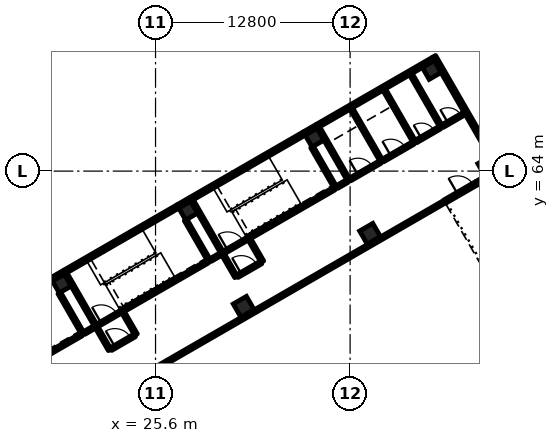
"""IFC4 building model, lengths in metres.
Left out: names, types, materials, properties, quantities, classifications, styles, units other than length and angle.
Written with IfcOpenShell. Run it as: python <this file> out.ifc"""

import sys

from ifc_helpers import new_model, si_unit, direction, frame, frame_2d, origin, origin_2d, place, context, subcontext, project, spatial, rectangle, extrude, element, fill, save


model = new_model("IFC4")
c1 = context("Model", 3, precision=1e-05, world=origin(), true_north=direction((0.0, 1.0)))
c2 = subcontext(c1, "Body", "Model", "MODEL_VIEW")
j1 = project(units=[si_unit("LENGTHUNIT", "METRE"), si_unit("PLANEANGLEUNIT", "RADIAN")], contexts=[c1])
p1 = place(None, origin())
s1 = spatial("IfcSite", under=j1, at=p1, CompositionType="ELEMENT")
p2 = place(p1, origin())
s2 = spatial("IfcBuilding", under=s1, at=p2, CompositionType="ELEMENT")
p3 = place(p2, frame((0.0, 0.0, 11.4)))
s3 = spatial("IfcBuildingStorey", under=s2, at=p3, CompositionType="ELEMENT", Elevation=11.4)
for number, where, z_axis, x_axis in (
    (1, (31.396, 55.077, 0.0), (0.0, 0.0, 1.0), (-0.5, 0.866, 0.0)),
    (2, (39.71, 59.877, 0.0), (0.0, 0.0, 1.0), (-0.5, 0.866, 0.0)),
):
    element("IfcColumn", number, at=place(p3, frame(where, z_axis=z_axis, x_axis=x_axis)), inside=s3, PredefinedType="COLUMN", context=c2, shape_type="SweptSolid", body=[
        extrude(rectangle(XDim=1.0, YDim=1.0, at=origin_2d()), origin(), (0.0, 0.0, 1.0), 4.8),
    ])
for number, where, z_axis, x_axis in (
    (3, (47.417, 64.327, 0.0), (0.0, 0.0, 1.0), (-0.5, 0.866, 0.0)),
    (4, (19.432, 56.599, 0.0), (0.0, 0.0, 1.0), (-0.5, 0.866, 0.0)),
    (5, (27.746, 61.399, 0.0), (0.0, 0.0, 1.0), (-0.5, 0.866, 0.0)),
    (6, (36.06, 66.199, 0.0), (0.0, 0.0, 1.0), (-0.5, 0.866, 0.0)),
    (7, (43.767, 70.649, 0.0), (0.0, 0.0, 1.0), (-0.5, 0.866, 0.0)),
):
    element("IfcColumn", number, at=place(p3, frame(where, z_axis=z_axis, x_axis=x_axis)), inside=s3, PredefinedType="COLUMN", context=c2, shape_type="SweptSolid", body=[
        extrude(rectangle(XDim=0.9, YDim=0.9, at=origin_2d()), origin(), (0.0, 0.0, 1.0), 4.8),
    ])
p4 = place(p3, frame((43.915, 71.542, 0.0), z_axis=(0.0, 0.0, 1.0), x_axis=(0.500001855621, -0.866024332438, 0.0)))
e8 = element("IfcWall", 8, at=p4, inside=s3, PredefinedType="SOLIDWALL", context=c2, shape_type="SweptSolid", body=[
    extrude(rectangle(XDim=10.312, YDim=0.25, at=frame_2d((5.156, 0.0))), origin(), (0.0, 0.0, 1.0), 4.5),
])
p5 = place(p3, frame((10.333, 52.009, 0.0), z_axis=(0.0, 0.0, 1.0), x_axis=(0.866023797515, 0.500002782129, 0.0)))
e9 = element("IfcWall", 9, at=p5, inside=s3, PredefinedType="SOLIDWALL", context=c2, shape_type="SweptSolid", body=[
    extrude(rectangle(XDim=9.725, YDim=0.25, at=frame_2d((4.863, 0.0))), origin(), (0.0, 0.0, 1.0), 4.5),
])
p6 = place(p3, frame((19.621, 57.372, 0.0), z_axis=(0.0, 0.0, 1.0), x_axis=(0.866021068297, 0.500007509209, 0.0)))
e10 = element("IfcWall", 10, at=p6, inside=s3, PredefinedType="SOLIDWALL", context=c2, shape_type="SweptSolid", body=[
    extrude(rectangle(XDim=8.6, YDim=0.25, at=frame_2d((4.3, 0.0))), origin(), (0.0, 0.0, 1.0), 4.5),
])
p7 = place(p3, frame((27.935, 62.172, 0.0), z_axis=(0.0, 0.0, 1.0), x_axis=(0.86604045752, 0.499973925258, 0.0)))
e11 = element("IfcWall", 11, at=p7, inside=s3, PredefinedType="SOLIDWALL", context=c2, shape_type="SweptSolid", body=[
    extrude(rectangle(XDim=8.6, YDim=0.25, at=frame_2d((4.3, 0.0))), origin(), (0.0, 0.0, 1.0), 4.5),
])
p8 = place(p3, frame((36.249, 66.972, 0.0), z_axis=(0.0, 0.0, 1.0), x_axis=(0.866013253925, 0.500021043584, 0.0)))
e12 = element("IfcWall", 12, at=p8, inside=s3, PredefinedType="SOLIDWALL", context=c2, shape_type="SweptSolid", body=[
    extrude(rectangle(XDim=8.8, YDim=0.25, at=frame_2d((4.4, 0.0))), origin(), (0.0, 0.0, 1.0), 4.5),
])
for number, where, z_axis, x_axis in (
    (13, (18.755, 56.872, 0.0), (0.0, 0.0, 1.0), (0.866, 0.5, 0.0)),
    (14, (27.069, 61.672, 0.0), (0.0, 0.0, 1.0), (0.866, 0.5, 0.0)),
    (15, (35.383, 66.472, 0.0), (0.0, 0.0, 1.0), (0.866, 0.5, 0.0)),
):
    element("IfcWall", number, at=place(p3, frame(where, z_axis=z_axis, x_axis=x_axis)), inside=s3, PredefinedType="SOLIDWALL", context=c2, shape_type="SweptSolid", body=[
        extrude(rectangle(XDim=1.0, YDim=0.25, at=frame_2d((0.5, 0.0))), origin(), (0.0, 0.0, 1.0), 4.5),
    ])
p9 = place(p3, frame((20.817, 53.299, 0.0), z_axis=(0.0, 0.0, 1.0), x_axis=(-0.49999285859, 0.86602952684, 0.0)))
e16 = element("IfcWall", 16, at=p9, inside=s3, PredefinedType="SOLIDWALL", context=c2, shape_type="SweptSolid", body=[
    extrude(rectangle(XDim=3.1, YDim=0.2, at=frame_2d((1.55, 0.0))), origin(), (0.0, 0.0, 1.0), 4.5),
])
p10 = place(p3, frame((21.683, 53.799, 0.0), z_axis=(0.0, 0.0, 1.0), x_axis=(-0.49999894854, 0.866026010844, 0.0)))
e17 = element("IfcWall", 17, at=p10, inside=s3, PredefinedType="SOLIDWALL", context=c2, shape_type="SweptSolid", body=[
    extrude(rectangle(XDim=4.0, YDim=0.2, at=frame_2d((2.0, 0.0))), origin(), (0.0, 0.0, 1.0), 4.5),
])
p11 = place(p3, frame((29.131, 58.099, 0.0), z_axis=(0.0, 0.0, 1.0), x_axis=(-0.49999285859, 0.86602952684, 0.0)))
e18 = element("IfcWall", 18, at=p11, inside=s3, PredefinedType="SOLIDWALL", context=c2, shape_type="SweptSolid", body=[
    extrude(rectangle(XDim=3.1, YDim=0.2, at=frame_2d((1.55, 0.0))), origin(), (0.0, 0.0, 1.0), 4.5),
])
p12 = place(p3, frame((29.997, 58.599, 0.0), z_axis=(0.0, 0.0, 1.0), x_axis=(-0.49999894854, 0.866026010844, 0.0)))
e19 = element("IfcWall", 19, at=p12, inside=s3, PredefinedType="SOLIDWALL", context=c2, shape_type="SweptSolid", body=[
    extrude(rectangle(XDim=4.0, YDim=0.2, at=frame_2d((2.0, 0.0))), origin(), (0.0, 0.0, 1.0), 4.5),
])
p13 = place(p3, frame((37.445, 62.899, 0.0), z_axis=(0.0, 0.0, 1.0), x_axis=(-0.500026960575, 0.86600983753, 0.0)))
e20 = element("IfcWall", 20, at=p13, inside=s3, PredefinedType="SOLIDWALL", context=c2, shape_type="SweptSolid", body=[
    extrude(rectangle(XDim=3.1, YDim=0.2, at=frame_2d((1.55, 0.0))), origin(), (0.0, 0.0, 1.0), 4.5),
])
p14 = place(p3, frame((14.972, 49.924, 0.0), z_axis=(0.0, 0.0, 1.0), x_axis=(0.86601134256, 0.500024353964, 0.0)))
e21 = element("IfcWall", 21, at=p14, inside=s3, PredefinedType="SOLIDWALL", context=c2, shape_type="SweptSolid", body=[
    extrude(rectangle(XDim=6.65, YDim=0.2, at=frame_2d((3.325, 0.0))), origin(), (0.0, 0.0, 1.0), 4.5),
])
p15 = place(p3, frame((21.77, 53.849, 0.0), z_axis=(0.0, 0.0, 1.0), x_axis=(0.866002029911, 0.500040482552, 0.0)))
e22 = element("IfcWall", 22, at=p15, inside=s3, PredefinedType="SOLIDWALL", context=c2, shape_type="SweptSolid", body=[
    extrude(rectangle(XDim=1.75, YDim=0.2, at=frame_2d((0.875, 0.0))), origin(), (0.0, 0.0, 1.0), 4.5),
])
p16 = place(p15, frame((0.3, 0.0, 0.0)))
e23 = element("IfcOpeningElement", 23, at=p16, cuts=e22, PredefinedType="OPENING", context=c2, shape_type="SweptSolid", body=[
    extrude(rectangle(XDim=1.2, YDim=2.1, at=frame_2d((0.6, 1.05))), frame((0.0, 0.11, 0.0), z_axis=(0.0, -1.0, 0.0), x_axis=(1.0, 0.0, 0.0)), (0.0, 0.0, 1.0), 0.22),
])
p17 = place(p3, frame((23.285, 54.724, 0.0), z_axis=(0.0, 0.0, 1.0), x_axis=(0.866027239912, 0.49999681972, 0.0)))
e24 = element("IfcWall", 24, at=p17, inside=s3, PredefinedType="SOLIDWALL", context=c2, shape_type="SweptSolid", body=[
    extrude(rectangle(XDim=6.65, YDim=0.2, at=frame_2d((3.325, 0.0))), origin(), (0.0, 0.0, 1.0), 4.5),
])
p18 = place(p3, frame((30.084, 58.649, 0.0), z_axis=(0.0, 0.0, 1.0), x_axis=(0.866036909293, 0.499980071345, 0.0)))
e25 = element("IfcWall", 25, at=p18, inside=s3, PredefinedType="SOLIDWALL", context=c2, shape_type="SweptSolid", body=[
    extrude(rectangle(XDim=1.75, YDim=0.2, at=frame_2d((0.875, 0.0))), origin(), (0.0, 0.0, 1.0), 4.5),
])
p19 = place(p18, frame((0.3, 0.0, 0.0)))
e26 = element("IfcOpeningElement", 26, at=p19, cuts=e25, PredefinedType="OPENING", context=c2, shape_type="SweptSolid", body=[
    extrude(rectangle(XDim=1.2, YDim=2.1, at=frame_2d((0.6, 1.05))), frame((0.0, 0.11, 0.0), z_axis=(0.0, -1.0, 0.0), x_axis=(1.0, 0.0, 0.0)), (0.0, 0.0, 1.0), 0.22),
])
p20 = place(p3, frame((31.599, 59.524, 0.0), z_axis=(0.0, 0.0, 1.0), x_axis=(0.866027239912, 0.49999681972, 0.0)))
e27 = element("IfcWall", 27, at=p20, inside=s3, PredefinedType="SOLIDWALL", context=c2, shape_type="SweptSolid", body=[
    extrude(rectangle(XDim=6.65, YDim=0.2, at=frame_2d((3.325, 0.0))), origin(), (0.0, 0.0, 1.0), 4.5),
])
for number, where, z_axis, x_axis in (
    (28, (38.311, 63.399, 0.0), (0.0, 0.0, 1.0), (-0.5, 0.866, 0.0)),
    (29, (40.476, 64.649, 0.0), (0.0, 0.0, 1.0), (-0.5, 0.866, 0.0)),
    (30, (42.641, 65.899, 0.0), (0.0, 0.0, 1.0), (-0.5, 0.866, 0.0)),
):
    element("IfcWall", number, at=place(p3, frame(where, z_axis=z_axis, x_axis=x_axis)), inside=s3, PredefinedType="SOLIDWALL", context=c2, shape_type="SweptSolid", body=[
        extrude(rectangle(XDim=4.0, YDim=0.2, at=frame_2d((2.0, 0.0))), origin(), (0.0, 0.0, 1.0), 4.5),
    ])
p21 = place(p3, frame((38.398, 63.449, 0.0), z_axis=(0.0, 0.0, 1.0), x_axis=(0.86602648383, 0.499998129301, 0.0)))
e31 = element("IfcWall", 31, at=p21, inside=s3, PredefinedType="SOLIDWALL", context=c2, shape_type="SweptSolid", body=[
    extrude(rectangle(XDim=2.3, YDim=0.2, at=frame_2d((1.15, 0.0))), origin(), (0.0, 0.0, 1.0), 4.5),
])
p22 = place(p21, frame((0.6, 0.0, 0.0)))
e32 = element("IfcOpeningElement", 32, at=p22, cuts=e31, PredefinedType="OPENING", context=c2, shape_type="SweptSolid", body=[
    extrude(rectangle(XDim=1.1, YDim=2.1, at=frame_2d((0.55, 1.05))), frame((0.0, 0.11, 0.0), z_axis=(0.0, -1.0, 0.0), x_axis=(1.0, 0.0, 0.0)), (0.0, 0.0, 1.0), 0.22),
])
p23 = place(p3, frame((40.563, 64.699, 0.0), z_axis=(0.0, 0.0, 1.0), x_axis=(0.86602648383, 0.499998129301, 0.0)))
e33 = element("IfcWall", 33, at=p23, inside=s3, PredefinedType="SOLIDWALL", context=c2, shape_type="SweptSolid", body=[
    extrude(rectangle(XDim=2.3, YDim=0.2, at=frame_2d((1.15, 0.0))), origin(), (0.0, 0.0, 1.0), 4.5),
])
p24 = place(p23, frame((0.6, 0.0, 0.0)))
e34 = element("IfcOpeningElement", 34, at=p24, cuts=e33, PredefinedType="OPENING", context=c2, shape_type="SweptSolid", body=[
    extrude(rectangle(XDim=1.1, YDim=2.1, at=frame_2d((0.55, 1.05))), frame((0.0, 0.11, 0.0), z_axis=(0.0, -1.0, 0.0), x_axis=(1.0, 0.0, 0.0)), (0.0, 0.0, 1.0), 0.22),
])
p25 = place(p3, frame((22.583, 52.24, 0.0), z_axis=(0.0, 0.0, 1.0), x_axis=(-0.499892348375, 0.866087547558, 0.0)))
e35 = element("IfcWall", 35, at=p25, inside=s3, PredefinedType="PARTITIONING", context=c2, shape_type="SweptSolid", body=[
    extrude(rectangle(XDim=1.7, YDim=0.2, at=frame_2d((0.85, 0.0))), origin(), (0.0, 0.0, 1.0), 3.9),
])
p26 = place(p3, frame((24.315, 53.24, 0.0), z_axis=(0.0, 0.0, 1.0), x_axis=(-0.500000056704, 0.866025371046, 0.0)))
e36 = element("IfcWall", 36, at=p26, inside=s3, PredefinedType="PARTITIONING", context=c2, shape_type="SweptSolid", body=[
    extrude(rectangle(XDim=1.7, YDim=0.2, at=frame_2d((0.85, 0.0))), origin(), (0.0, 0.0, 1.0), 3.9),
])
for number, where, z_axis, x_axis in (
    (37, (30.897, 57.041, 0.0), (0.0, 0.0, 1.0), (-0.5, 0.866, 0.0)),
    (38, (32.629, 58.041, 0.0), (0.0, 0.0, 1.0), (-0.5, 0.866, 0.0)),
):
    element("IfcWall", number, at=place(p3, frame(where, z_axis=z_axis, x_axis=x_axis)), inside=s3, PredefinedType="PARTITIONING", context=c2, shape_type="SweptSolid", body=[
        extrude(rectangle(XDim=1.7, YDim=0.2, at=frame_2d((0.85, 0.0))), origin(), (0.0, 0.0, 1.0), 3.9),
    ])
p27 = place(p3, frame((22.67, 52.291, 0.0), z_axis=(0.0, 0.0, 1.0), x_axis=(0.865989075817, 0.500062916607, 0.0)))
e39 = element("IfcWall", 39, at=p27, inside=s3, PredefinedType="PARTITIONING", context=c2, shape_type="SweptSolid", body=[
    extrude(rectangle(XDim=1.8, YDim=0.2, at=frame_2d((0.9, 0.0))), origin(), (0.0, 0.0, 1.0), 3.9),
])
p28 = place(p27, frame((0.3, 0.0, 0.0)))
e40 = element("IfcOpeningElement", 40, at=p28, cuts=e39, PredefinedType="OPENING", context=c2, shape_type="SweptSolid", body=[
    extrude(rectangle(XDim=1.2, YDim=2.1, at=frame_2d((0.6, 1.05))), frame((0.0, 0.11, 0.0), z_axis=(0.0, -1.0, 0.0), x_axis=(1.0, 0.0, 0.0)), (0.0, 0.0, 1.0), 0.22),
])
p29 = place(p3, frame((30.984, 57.091, 0.0), z_axis=(0.0, 0.0, 1.0), x_axis=(0.866047807691, 0.499961193289, 0.0)))
e41 = element("IfcWall", 41, at=p29, inside=s3, PredefinedType="PARTITIONING", context=c2, shape_type="SweptSolid", body=[
    extrude(rectangle(XDim=1.8, YDim=0.2, at=frame_2d((0.9, 0.0))), origin(), (0.0, 0.0, 1.0), 3.9),
])
p30 = place(p29, frame((0.3, 0.0, 0.0)))
e42 = element("IfcOpeningElement", 42, at=p30, cuts=e41, PredefinedType="OPENING", context=c2, shape_type="SweptSolid", body=[
    extrude(rectangle(XDim=1.2, YDim=2.1, at=frame_2d((0.6, 1.05))), frame((0.0, 0.11, 0.0), z_axis=(0.0, -1.0, 0.0), x_axis=(1.0, 0.0, 0.0)), (0.0, 0.0, 1.0), 0.22),
])
p31 = place(p3, frame((44.612, 61.986, 0.0), z_axis=(0.0, 0.0, 1.0), x_axis=(0.866014668023, 0.500018594424, 0.0)))
e43 = element("IfcWall", 43, at=p31, inside=s3, PredefinedType="SOLIDWALL", context=c2, shape_type="SweptSolid", body=[
    extrude(rectangle(XDim=2.45, YDim=0.25, at=frame_2d((1.225, 0.0))), origin(), (0.0, 0.0, 1.0), 3.9),
])
p32 = place(p31, frame((1.0, 0.0, 0.0)))
e44 = element("IfcOpeningElement", 44, at=p32, cuts=e43, PredefinedType="OPENING", context=c2, shape_type="SweptSolid", body=[
    extrude(rectangle(XDim=1.2, YDim=2.1, at=frame_2d((0.6, 1.05))), frame((0.0, 0.135, 0.0), z_axis=(0.0, -1.0, 0.0), x_axis=(1.0, 0.0, 0.0)), (0.0, 0.0, 1.0), 0.27),
])
p33 = place(p3, frame((46.734, 63.211, 0.0), z_axis=(0.0, 0.0, 1.0), x_axis=(0.866055983265, 0.499947031044, 0.0)))
e45 = element("IfcWall", 45, at=p33, inside=s3, PredefinedType="SOLIDWALL", context=c2, shape_type="SweptSolid", body=[
    extrude(rectangle(XDim=1.6, YDim=0.25, at=frame_2d((0.8, 0.0))), origin(), (0.0, 0.0, 1.0), 3.9),
])
p34 = place(p3, frame((44.395, 66.912, 0.0), z_axis=(0.0, 0.0, 1.0), x_axis=(-0.49999894854, 0.866026010844, 0.0)))
e46 = element("IfcWall", 46, at=p34, inside=s3, PredefinedType="PARTITIONING", context=c2, shape_type="SweptSolid", body=[
    extrude(rectangle(XDim=4.0, YDim=0.2, at=frame_2d((2.0, 0.0))), origin(), (0.0, 0.0, 1.0), 3.9),
])
p35 = place(p3, frame((42.728, 65.949, 0.0), z_axis=(0.0, 0.0, 1.0), x_axis=(0.866036312054, 0.499981105847, 0.0)))
e47 = element("IfcWall", 47, at=p35, inside=s3, PredefinedType="PARTITIONING", context=c2, shape_type="SweptSolid", body=[
    extrude(rectangle(XDim=1.825, YDim=0.2, at=frame_2d((0.912, 0.0))), origin(), (0.0, 0.0, 1.0), 3.9),
])
p36 = place(p35, frame((0.413, 0.0, 0.0)))
e48 = element("IfcOpeningElement", 48, at=p36, cuts=e47, PredefinedType="OPENING", context=c2, shape_type="SweptSolid", body=[
    extrude(rectangle(XDim=1.0, YDim=2.1, at=frame_2d((0.5, 1.05))), frame((0.0, 0.11, 0.0), z_axis=(0.0, -1.0, 0.0), x_axis=(1.0, 0.0, 0.0)), (0.0, 0.0, 1.0), 0.22),
])
p37 = place(p3, frame((44.481, 66.962, 0.0), z_axis=(0.0, 0.0, 1.0), x_axis=(0.866027799164, 0.499995851058, 0.0)))
e49 = element("IfcWall", 49, at=p37, inside=s3, PredefinedType="PARTITIONING", context=c2, shape_type="SweptSolid", body=[
    extrude(rectangle(XDim=1.675, YDim=0.2, at=frame_2d((0.837, 0.0))), origin(), (0.0, 0.0, 1.0), 3.9),
])
p38 = place(p37, frame((0.413, 0.0, 0.0)))
e50 = element("IfcOpeningElement", 50, at=p38, cuts=e49, PredefinedType="OPENING", context=c2, shape_type="SweptSolid", body=[
    extrude(rectangle(XDim=1.0, YDim=2.1, at=frame_2d((0.5, 1.05))), frame((0.0, 0.11, 0.0), z_axis=(0.0, -1.0, 0.0), x_axis=(1.0, 0.0, 0.0)), (0.0, 0.0, 1.0), 0.22),
])
p39 = place(p3, frame((10.491, 42.286, 0.0), z_axis=(0.0, 0.0, 1.0), x_axis=(0.866025540551, 0.499999763114, 0.0)))
e51 = element("IfcWall", 51, at=p39, inside=s3, PredefinedType="PARTITIONING", context=c2, shape_type="SweptSolid", body=[
    extrude(rectangle(XDim=39.4, YDim=0.2, at=frame_2d((19.7, 0.0))), origin(), (0.0, 0.0, 1.0), 3.9),
])
p40 = place(p3, frame((20.904, 53.349, 0.0), z_axis=(0.0, 0.0, 1.0), x_axis=(0.865961984968, 0.500109828528, 0.0)))
e52 = element("IfcWall", 52, at=p40, inside=s3, PredefinedType="PARTITIONING", context=c2, shape_type="SweptSolid", body=[
    extrude(rectangle(XDim=0.8, YDim=0.2, at=frame_2d((0.4, 0.0))), origin(), (0.0, 0.0, 1.0), 3.9),
])
p41 = place(p3, frame((29.218, 58.149, 0.0), z_axis=(0.0, 0.0, 1.0), x_axis=(0.866017831539, 0.500013115284, 0.0)))
e53 = element("IfcWall", 53, at=p41, inside=s3, PredefinedType="PARTITIONING", context=c2, shape_type="SweptSolid", body=[
    extrude(rectangle(XDim=0.8, YDim=0.2, at=frame_2d((0.4, 0.0))), origin(), (0.0, 0.0, 1.0), 3.9),
])
p42 = place(p3, frame((37.531, 62.949, 0.0), z_axis=(0.0, 0.0, 1.0), x_axis=(0.866094119867, 0.499880961361, 0.0)))
e54 = element("IfcWall", 54, at=p42, inside=s3, PredefinedType="PARTITIONING", context=c2, shape_type="SweptSolid", body=[
    extrude(rectangle(XDim=0.8, YDim=0.2, at=frame_2d((0.4, 0.0))), origin(), (0.0, 0.0, 1.0), 3.9),
])
p43 = place(p16, origin())
e55 = element("IfcDoor", 55, at=p43, inside=s3, OperationType="SINGLE_SWING_LEFT", PredefinedType="DOOR", context=c2, shape_type="SweptSolid", body=[
    extrude(rectangle(XDim=1.2, YDim=2.1, at=frame_2d((0.6, 1.05))), frame((0.0, 0.025, 0.0), z_axis=(0.0, -1.0, 0.0), x_axis=(1.0, 0.0, 0.0)), (0.0, 0.0, 1.0), 0.05),
])
fill(e23, e55)
p44 = place(p19, origin())
e56 = element("IfcDoor", 56, at=p44, inside=s3, OperationType="SINGLE_SWING_LEFT", PredefinedType="DOOR", context=c2, shape_type="SweptSolid", body=[
    extrude(rectangle(XDim=1.2, YDim=2.1, at=frame_2d((0.6, 1.05))), frame((0.0, 0.025, 0.0), z_axis=(0.0, -1.0, 0.0), x_axis=(1.0, 0.0, 0.0)), (0.0, 0.0, 1.0), 0.05),
])
fill(e26, e56)
p45 = place(p22, origin())
e57 = element("IfcDoor", 57, at=p45, inside=s3, OperationType="DOUBLE_DOOR_SLIDING", PredefinedType="DOOR", context=c2, shape_type="SweptSolid", body=[
    extrude(rectangle(XDim=1.1, YDim=2.1, at=frame_2d((0.55, 1.05))), frame((0.0, 0.025, 0.0), z_axis=(0.0, -1.0, 0.0), x_axis=(1.0, 0.0, 0.0)), (0.0, 0.0, 1.0), 0.05),
])
fill(e32, e57)
p46 = place(p24, origin())
e58 = element("IfcDoor", 58, at=p46, inside=s3, OperationType="DOUBLE_DOOR_SLIDING", PredefinedType="DOOR", context=c2, shape_type="SweptSolid", body=[
    extrude(rectangle(XDim=1.1, YDim=2.1, at=frame_2d((0.55, 1.05))), frame((0.0, 0.025, 0.0), z_axis=(0.0, -1.0, 0.0), x_axis=(1.0, 0.0, 0.0)), (0.0, 0.0, 1.0), 0.05),
])
fill(e34, e58)
p47 = place(p28, origin())
e59 = element("IfcDoor", 59, at=p47, inside=s3, OperationType="SINGLE_SWING_LEFT", PredefinedType="DOOR", context=c2, shape_type="SweptSolid", body=[
    extrude(rectangle(XDim=1.2, YDim=2.1, at=frame_2d((0.6, 1.05))), frame((0.0, 0.025, 0.0), z_axis=(0.0, -1.0, 0.0), x_axis=(1.0, 0.0, 0.0)), (0.0, 0.0, 1.0), 0.05),
])
fill(e40, e59)
p48 = place(p30, origin())
e60 = element("IfcDoor", 60, at=p48, inside=s3, OperationType="SINGLE_SWING_LEFT", PredefinedType="DOOR", context=c2, shape_type="SweptSolid", body=[
    extrude(rectangle(XDim=1.2, YDim=2.1, at=frame_2d((0.6, 1.05))), frame((0.0, 0.025, 0.0), z_axis=(0.0, -1.0, 0.0), x_axis=(1.0, 0.0, 0.0)), (0.0, 0.0, 1.0), 0.05),
])
fill(e42, e60)
p49 = place(p32, origin())
e61 = element("IfcDoor", 61, at=p49, inside=s3, OperationType="SINGLE_SWING_LEFT", PredefinedType="DOOR", context=c2, shape_type="SweptSolid", body=[
    extrude(rectangle(XDim=1.2, YDim=2.1, at=frame_2d((0.6, 1.05))), frame((0.0, 0.025, 0.0), z_axis=(0.0, -1.0, 0.0), x_axis=(1.0, 0.0, 0.0)), (0.0, 0.0, 1.0), 0.05),
])
fill(e44, e61)
p50 = place(p36, origin())
e62 = element("IfcDoor", 62, at=p50, inside=s3, OperationType="SINGLE_SWING_LEFT", PredefinedType="DOOR", context=c2, shape_type="SweptSolid", body=[
    extrude(rectangle(XDim=1.0, YDim=2.1, at=frame_2d((0.5, 1.05))), frame((0.0, 0.025, 0.0), z_axis=(0.0, -1.0, 0.0), x_axis=(1.0, 0.0, 0.0)), (0.0, 0.0, 1.0), 0.05),
])
fill(e48, e62)
p51 = place(p38, origin())
e63 = element("IfcDoor", 63, at=p51, inside=s3, OperationType="SINGLE_SWING_LEFT", PredefinedType="DOOR", context=c2, shape_type="SweptSolid", body=[
    extrude(rectangle(XDim=1.0, YDim=2.1, at=frame_2d((0.5, 1.05))), frame((0.0, 0.025, 0.0), z_axis=(0.0, -1.0, 0.0), x_axis=(1.0, 0.0, 0.0)), (0.0, 0.0, 1.0), 0.05),
])
fill(e50, e63)
save(model, sys.argv[1])
